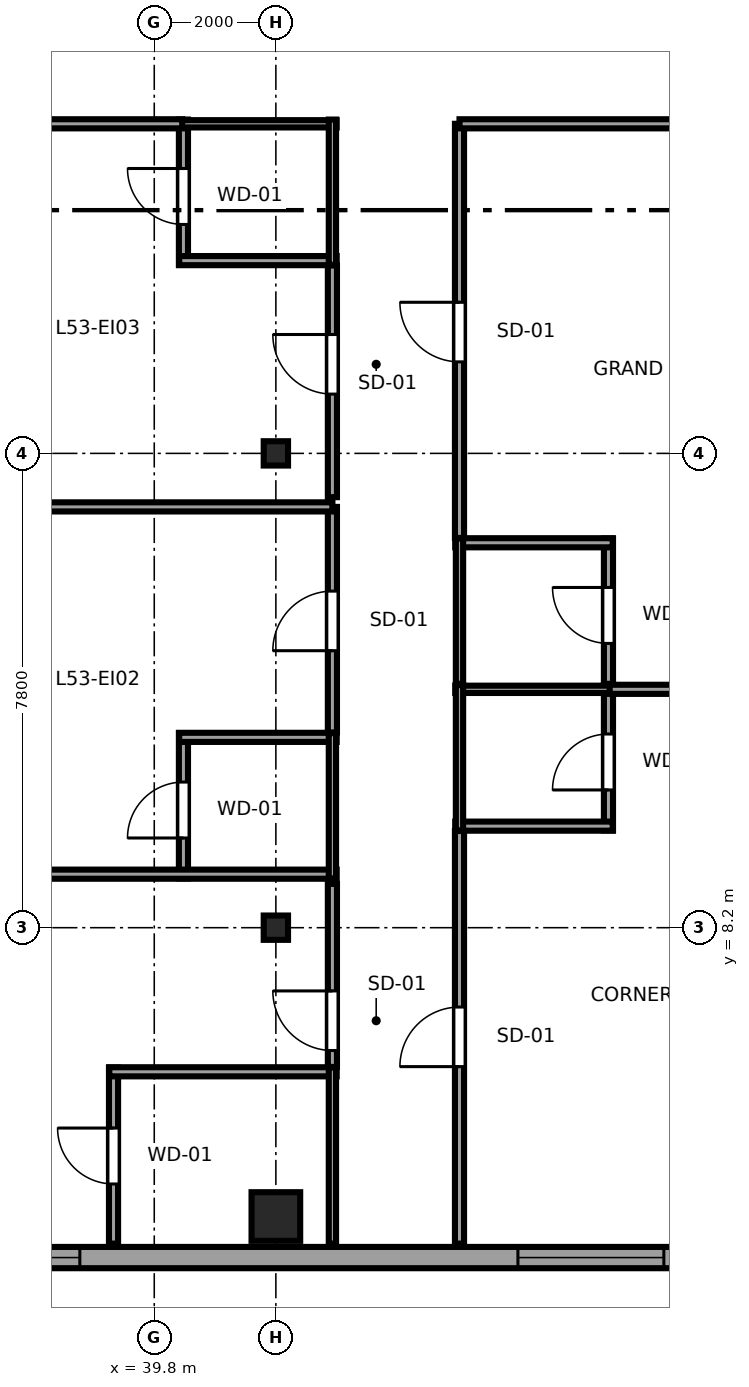
"""IFC4 building model, lengths in metres.
Left out: names, types, materials, properties, quantities, classifications, styles, units other than length and angle.
Written with IfcOpenShell. Run it as: python <this file> out.ifc"""

import sys

from ifc_helpers import new_model, si_unit, direction, frame, frame_2d, origin, origin_2d, place, context, subcontext, project, spatial, rectangle, i_section, extrude, source, transform, mapped, element, fill, save


model = new_model("IFC4")
c1 = context("Model", 3, precision=1e-05, world=origin(), true_north=direction((0.0, 1.0)))
c2 = subcontext(c1, "Body", "Model", "MODEL_VIEW")
j1 = project(units=[si_unit("LENGTHUNIT", "METRE"), si_unit("PLANEANGLEUNIT", "RADIAN")], contexts=[c1])
p1 = place(None, origin())
s1 = spatial("IfcSite", under=j1, at=p1, CompositionType="ELEMENT")
p2 = place(p1, origin())
s2 = spatial("IfcBuilding", under=s1, at=p2, CompositionType="ELEMENT")
p3 = place(p2, frame((0.0, 0.0, 201.75)))
s3 = spatial("IfcBuildingStorey", under=s2, at=p3, CompositionType="ELEMENT", Elevation=201.75)
m1 = source(origin(), c2, "Body", "SweptSolid", [
    extrude(rectangle(XDim=0.8, YDim=0.8, at=origin_2d()), origin(), (0.0, 0.0, 1.0), 3.55),
])
p4 = place(p3, frame((41.8, 3.45, 0.0), z_axis=(0.0, 0.0, 1.0), x_axis=(1.0, 0.0, 0.0)))
e1 = element("IfcColumn", 1, at=p4, inside=s3, PredefinedType="COLUMN", context=c2, shape_type="MappedRepresentation", body=[
    mapped(m1, transform((0.0, 0.0, 0.0), x_axis=(1.0, 0.0, 0.0), y_axis=(0.0, 1.0, 0.0), z_axis=(0.0, 0.0, 1.0), scale=1.0)),
])
m2 = source(origin(), c2, "Body", "SweptSolid", [
    extrude(i_section(OverallWidth=0.4, OverallDepth=0.4, WebThickness=0.02, FlangeThickness=0.035, at=origin_2d()), origin(), (0.0, 0.0, 1.0), 3.55),
])
for number, where, z_axis, x_axis in (
    (2, (41.8, 8.2, 0.0), (0.0, 0.0, 1.0), (1.0, 0.0, 0.0)),
    (3, (41.8, 16.0, 0.0), (0.0, 0.0, 1.0), (1.0, 0.0, 0.0)),
):
    element("IfcColumn", number, at=place(p3, frame(where, z_axis=z_axis, x_axis=x_axis)), inside=s3, PredefinedType="COLUMN", context=c2, shape_type="MappedRepresentation", body=[
        mapped(m2, transform((0.0, 0.0, 0.0), x_axis=(1.0, 0.0, 0.0), y_axis=(0.0, 1.0, 0.0), z_axis=(0.0, 0.0, 1.0), scale=1.0)),
    ])
p5 = place(p3, frame((34.375, 2.775, 0.0), z_axis=(0.0, 0.0, 1.0), x_axis=(1.0, 0.0, 0.0)))
e4 = element("IfcWall", 4, at=p5, inside=s3, PredefinedType="SOLIDWALL", context=c2, shape_type="SweptSolid", body=[
    extrude(rectangle(XDim=15.608, YDim=0.35, at=frame_2d((7.804, 0.0))), origin(), (0.0, 0.0, 1.0), 3.29),
])
p6 = place(p5, frame((1.801, 0.0, 0.68)))
e5 = element("IfcOpeningElement", 5, at=p6, cuts=e4, PredefinedType="OPENING", context=c2, shape_type="SweptSolid", body=[
    extrude(rectangle(XDim=2.4, YDim=1.9, at=frame_2d((1.2, 0.95))), frame((0.0, 0.185, 0.0), z_axis=(0.0, -1.0, 0.0), x_axis=(1.0, 0.0, 0.0)), (0.0, 0.0, 1.0), 0.37),
])
p7 = place(p5, frame((11.406, 0.0, 0.68)))
e6 = element("IfcOpeningElement", 6, at=p7, cuts=e4, PredefinedType="OPENING", context=c2, shape_type="SweptSolid", body=[
    extrude(rectangle(XDim=2.4, YDim=1.9, at=frame_2d((1.2, 0.95))), frame((0.0, 0.185, 0.0), z_axis=(0.0, -1.0, 0.0), x_axis=(1.0, 0.0, 0.0)), (0.0, 0.0, 1.0), 0.37),
])
p8 = place(p3, frame((39.13, 3.005, 0.0), z_axis=(0.0, 0.0, 1.0), x_axis=(0.0, 1.0, 0.0)))
e7 = element("IfcWall", 7, at=p8, inside=s3, PredefinedType="PARTITIONING", context=c2, shape_type="SweptSolid", body=[
    extrude(rectangle(XDim=2.895, YDim=0.15, at=frame_2d((1.448, 0.0))), origin(), (0.0, 0.0, 1.0), 3.29),
])
p9 = place(p8, frame((0.98, 0.0, 0.0)))
e8 = element("IfcOpeningElement", 8, at=p9, cuts=e7, PredefinedType="OPENING", context=c2, shape_type="SweptSolid", body=[
    extrude(rectangle(XDim=0.92, YDim=2.01, at=frame_2d((0.46, 1.005))), frame((0.0, 0.085, 0.0), z_axis=(0.0, -1.0, 0.0), x_axis=(1.0, 0.0, 0.0)), (0.0, 0.0, 1.0), 0.17),
])
p10 = place(p3, frame((39.06, 5.83, 0.0), z_axis=(0.0, 0.0, 1.0), x_axis=(1.0, 0.0, 0.0)))
e9 = element("IfcWall", 9, at=p10, inside=s3, PredefinedType="PARTITIONING", context=c2, shape_type="SweptSolid", body=[
    extrude(rectangle(XDim=3.74, YDim=0.15, at=frame_2d((1.87, 0.0))), origin(), (0.0, 0.0, 1.0), 3.29),
])
p11 = place(p3, frame((42.73, 3.005, 0.0), z_axis=(0.0, 0.0, 1.0), x_axis=(0.0, 1.0, 0.0)))
e10 = element("IfcWall", 10, at=p11, inside=s3, PredefinedType="PLUMBINGWALL", context=c2, shape_type="SweptSolid", body=[
    extrude(rectangle(XDim=2.895, YDim=0.12, at=frame_2d((1.448, 0.0))), origin(), (0.0, 0.0, 1.0), 3.29),
])
p12 = place(p3, frame((40.28, 9.01, 0.0), z_axis=(0.0, 0.0, 1.0), x_axis=(0.0, 1.0, 0.0)))
e11 = element("IfcWall", 11, at=p12, inside=s3, PredefinedType="PARTITIONING", context=c2, shape_type="SweptSolid", body=[
    extrude(rectangle(XDim=2.39, YDim=0.15, at=frame_2d((1.195, 0.0))), origin(), (0.0, 0.0, 1.0), 3.29),
])
p13 = place(p12, frame((0.665, 0.0, 0.0)))
e12 = element("IfcOpeningElement", 12, at=p13, cuts=e11, PredefinedType="OPENING", context=c2, shape_type="SweptSolid", body=[
    extrude(rectangle(XDim=0.92, YDim=2.01, at=frame_2d((0.46, 1.005))), frame((0.0, 0.085, 0.0), z_axis=(0.0, -1.0, 0.0), x_axis=(1.0, 0.0, 0.0)), (0.0, 0.0, 1.0), 0.17),
])
p14 = place(p3, frame((34.65, 9.08, 0.0), z_axis=(0.0, 0.0, 1.0), x_axis=(1.0, 0.0, 0.0)))
e13 = element("IfcWall", 13, at=p14, inside=s3, PredefinedType="PARTITIONING", context=c2, shape_type="SweptSolid", body=[
    extrude(rectangle(XDim=8.15, YDim=0.15, at=frame_2d((4.075, 0.0))), origin(), (0.0, 0.0, 1.0), 3.29),
])
p15 = place(p3, frame((40.21, 11.33, 0.0), z_axis=(0.0, 0.0, 1.0), x_axis=(1.0, 0.0, 0.0)))
e14 = element("IfcWall", 14, at=p15, inside=s3, PredefinedType="PARTITIONING", context=c2, shape_type="SweptSolid", body=[
    extrude(rectangle(XDim=2.59, YDim=0.15, at=frame_2d((1.295, 0.0))), origin(), (0.0, 0.0, 1.0), 3.29),
])
p16 = place(p3, frame((42.73, 9.01, 0.0), z_axis=(0.0, 0.0, 1.0), x_axis=(0.0, 1.0, 0.0)))
e15 = element("IfcWall", 15, at=p16, inside=s3, PredefinedType="PLUMBINGWALL", context=c2, shape_type="SweptSolid", body=[
    extrude(rectangle(XDim=2.39, YDim=0.12, at=frame_2d((1.195, 0.0))), origin(), (0.0, 0.0, 1.0), 3.29),
])
p17 = place(p3, frame((40.28, 19.1, 0.0), z_axis=(0.0, 0.0, 1.0), x_axis=(0.0, 1.0, 0.0)))
e16 = element("IfcWall", 16, at=p17, inside=s3, PredefinedType="PARTITIONING", context=c2, shape_type="SweptSolid", body=[
    extrude(rectangle(XDim=2.39, YDim=0.15, at=frame_2d((1.195, 0.0))), origin(), (0.0, 0.0, 1.0), 3.29),
])
p18 = place(p17, frame((0.665, 0.0, 0.0)))
e17 = element("IfcOpeningElement", 17, at=p18, cuts=e16, PredefinedType="OPENING", context=c2, shape_type="SweptSolid", body=[
    extrude(rectangle(XDim=0.92, YDim=2.01, at=frame_2d((0.46, 1.005))), frame((0.0, 0.085, 0.0), z_axis=(0.0, -1.0, 0.0), x_axis=(1.0, 0.0, 0.0)), (0.0, 0.0, 1.0), 0.17),
])
p19 = place(p3, frame((40.21, 19.17, 0.0), z_axis=(0.0, 0.0, 1.0), x_axis=(1.0, 0.0, 0.0)))
e18 = element("IfcWall", 18, at=p19, inside=s3, PredefinedType="PARTITIONING", context=c2, shape_type="SweptSolid", body=[
    extrude(rectangle(XDim=2.59, YDim=0.15, at=frame_2d((1.295, 0.0))), origin(), (0.0, 0.0, 1.0), 3.29),
])
p20 = place(p3, frame((40.21, 21.42, 0.0), z_axis=(0.0, 0.0, 1.0), x_axis=(1.0, 0.0, 0.0)))
e19 = element("IfcWall", 19, at=p20, inside=s3, PredefinedType="PLUMBINGWALL", context=c2, shape_type="SweptSolid", body=[
    extrude(rectangle(XDim=2.59, YDim=0.12, at=frame_2d((1.295, 0.0))), origin(), (0.0, 0.0, 1.0), 3.29),
])
p21 = place(p3, frame((42.73, 19.1, 0.0), z_axis=(0.0, 0.0, 1.0), x_axis=(0.0, 1.0, 0.0)))
e20 = element("IfcWall", 20, at=p21, inside=s3, PredefinedType="PLUMBINGWALL", context=c2, shape_type="SweptSolid", body=[
    extrude(rectangle(XDim=2.39, YDim=0.12, at=frame_2d((1.195, 0.0))), origin(), (0.0, 0.0, 1.0), 3.29),
])
p22 = place(p3, frame((47.27, 9.8, 0.0), z_axis=(0.0, 0.0, 1.0), x_axis=(0.0, 1.0, 0.0)))
e21 = element("IfcWall", 21, at=p22, inside=s3, PredefinedType="PARTITIONING", context=c2, shape_type="SweptSolid", body=[
    extrude(rectangle(XDim=2.39, YDim=0.15, at=frame_2d((1.195, 0.0))), origin(), (0.0, 0.0, 1.0), 3.29),
])
p23 = place(p22, frame((0.665, 0.0, 0.0)))
e22 = element("IfcOpeningElement", 22, at=p23, cuts=e21, PredefinedType="OPENING", context=c2, shape_type="SweptSolid", body=[
    extrude(rectangle(XDim=0.92, YDim=2.01, at=frame_2d((0.46, 1.005))), frame((0.0, 0.085, 0.0), z_axis=(0.0, -1.0, 0.0), x_axis=(1.0, 0.0, 0.0)), (0.0, 0.0, 1.0), 0.17),
])
p24 = place(p3, frame((44.75, 9.87, 0.0), z_axis=(0.0, 0.0, 1.0), x_axis=(1.0, 0.0, 0.0)))
e23 = element("IfcWall", 23, at=p24, inside=s3, PredefinedType="PARTITIONING", context=c2, shape_type="SweptSolid", body=[
    extrude(rectangle(XDim=2.59, YDim=0.15, at=frame_2d((1.295, 0.0))), origin(), (0.0, 0.0, 1.0), 3.29),
])
p25 = place(p3, frame((44.75, 12.12, 0.0), z_axis=(0.0, 0.0, 1.0), x_axis=(1.0, 0.0, 0.0)))
e24 = element("IfcWall", 24, at=p25, inside=s3, PredefinedType="PLUMBINGWALL", context=c2, shape_type="SweptSolid", body=[
    extrude(rectangle(XDim=2.59, YDim=0.12, at=frame_2d((1.295, 0.0))), origin(), (0.0, 0.0, 1.0), 3.29),
])
p26 = place(p3, frame((44.82, 9.8, 0.0), z_axis=(0.0, 0.0, 1.0), x_axis=(0.0, 1.0, 0.0)))
e25 = element("IfcWall", 25, at=p26, inside=s3, PredefinedType="PLUMBINGWALL", context=c2, shape_type="SweptSolid", body=[
    extrude(rectangle(XDim=2.39, YDim=0.12, at=frame_2d((1.195, 0.0))), origin(), (0.0, 0.0, 1.0), 3.29),
])
p27 = place(p3, frame((47.27, 12.21, 0.0), z_axis=(0.0, 0.0, 1.0), x_axis=(0.0, 1.0, 0.0)))
e26 = element("IfcWall", 26, at=p27, inside=s3, PredefinedType="PARTITIONING", context=c2, shape_type="SweptSolid", body=[
    extrude(rectangle(XDim=2.39, YDim=0.15, at=frame_2d((1.195, 0.0))), origin(), (0.0, 0.0, 1.0), 3.29),
])
p28 = place(p27, frame((0.665, 0.0, 0.0)))
e27 = element("IfcOpeningElement", 27, at=p28, cuts=e26, PredefinedType="OPENING", context=c2, shape_type="SweptSolid", body=[
    extrude(rectangle(XDim=0.92, YDim=2.01, at=frame_2d((0.46, 1.005))), frame((0.0, 0.085, 0.0), z_axis=(0.0, -1.0, 0.0), x_axis=(1.0, 0.0, 0.0)), (0.0, 0.0, 1.0), 0.17),
])
p29 = place(p3, frame((44.75, 14.53, 0.0), z_axis=(0.0, 0.0, 1.0), x_axis=(1.0, 0.0, 0.0)))
e28 = element("IfcWall", 28, at=p29, inside=s3, PredefinedType="PARTITIONING", context=c2, shape_type="SweptSolid", body=[
    extrude(rectangle(XDim=2.59, YDim=0.15, at=frame_2d((1.295, 0.0))), origin(), (0.0, 0.0, 1.0), 3.29),
])
p30 = place(p3, frame((44.82, 12.21, 0.0), z_axis=(0.0, 0.0, 1.0), x_axis=(0.0, 1.0, 0.0)))
e29 = element("IfcWall", 29, at=p30, inside=s3, PredefinedType="PLUMBINGWALL", context=c2, shape_type="SweptSolid", body=[
    extrude(rectangle(XDim=2.39, YDim=0.12, at=frame_2d((1.195, 0.0))), origin(), (0.0, 0.0, 1.0), 3.29),
])
p31 = place(p3, frame((42.73, 5.91, 0.0), z_axis=(0.0, 0.0, 1.0), x_axis=(0.0, 1.0, 0.0)))
e30 = element("IfcWall", 30, at=p31, inside=s3, PredefinedType="PARTITIONING", context=c2, shape_type="SweptSolid", body=[
    extrude(rectangle(XDim=3.01, YDim=0.15, at=frame_2d((1.505, 0.0))), origin(), (0.0, 0.0, 1.0), 3.29),
])
p32 = place(p31, frame((0.27, 0.0, 0.0)))
e31 = element("IfcOpeningElement", 31, at=p32, cuts=e30, PredefinedType="OPENING", context=c2, shape_type="SweptSolid", body=[
    extrude(rectangle(XDim=0.98, YDim=2.12, at=frame_2d((0.49, 1.06))), frame((0.0, 0.085, 0.0), z_axis=(0.0, -1.0, 0.0), x_axis=(1.0, 0.0, 0.0)), (0.0, 0.0, 1.0), 0.17),
])
p33 = place(p3, frame((42.73, 11.41, 0.0), z_axis=(0.0, 0.0, 1.0), x_axis=(0.0, 1.0, 0.0)))
e32 = element("IfcWall", 32, at=p33, inside=s3, PredefinedType="PARTITIONING", context=c2, shape_type="SweptSolid", body=[
    extrude(rectangle(XDim=3.71, YDim=0.15, at=frame_2d((1.855, 0.0))), origin(), (0.0, 0.0, 1.0), 3.29),
])
p34 = place(p33, frame((1.345, 0.0, 0.0)))
e33 = element("IfcOpeningElement", 33, at=p34, cuts=e32, PredefinedType="OPENING", context=c2, shape_type="SweptSolid", body=[
    extrude(rectangle(XDim=0.98, YDim=2.12, at=frame_2d((0.49, 1.06))), frame((0.0, 0.085, 0.0), z_axis=(0.0, -1.0, 0.0), x_axis=(1.0, 0.0, 0.0)), (0.0, 0.0, 1.0), 0.17),
])
p35 = place(p3, frame((34.65, 15.12, 0.0), z_axis=(0.0, 0.0, 1.0), x_axis=(1.0, 0.0, 0.0)))
e34 = element("IfcWall", 34, at=p35, inside=s3, PredefinedType="PARTITIONING", context=c2, shape_type="SweptSolid", body=[
    extrude(rectangle(XDim=8.08, YDim=0.15, at=frame_2d((4.04, 0.0))), origin(), (0.0, 0.0, 1.0), 3.29),
])
p36 = place(p3, frame((42.73, 15.28, 0.0), z_axis=(0.0, 0.0, 1.0), x_axis=(0.0, 1.0, 0.0)))
e35 = element("IfcWall", 35, at=p36, inside=s3, PredefinedType="PARTITIONING", context=c2, shape_type="SweptSolid", body=[
    extrude(rectangle(XDim=3.81, YDim=0.15, at=frame_2d((1.905, 0.0))), origin(), (0.0, 0.0, 1.0), 3.29),
])
p37 = place(p36, frame((1.695, 0.0, 0.0)))
e36 = element("IfcOpeningElement", 36, at=p37, cuts=e35, PredefinedType="OPENING", context=c2, shape_type="SweptSolid", body=[
    extrude(rectangle(XDim=0.98, YDim=2.12, at=frame_2d((0.49, 1.06))), frame((0.0, 0.085, 0.0), z_axis=(0.0, -1.0, 0.0), x_axis=(1.0, 0.0, 0.0)), (0.0, 0.0, 1.0), 0.17),
])
p38 = place(p3, frame((34.65, 21.42, 0.0), z_axis=(0.0, 0.0, 1.0), x_axis=(1.0, 0.0, 0.0)))
e37 = element("IfcWall", 37, at=p38, inside=s3, PredefinedType="PARTITIONING", context=c2, shape_type="SweptSolid", body=[
    extrude(rectangle(XDim=5.61, YDim=0.15, at=frame_2d((2.805, 0.0))), origin(), (0.0, 0.0, 1.0), 3.29),
])
p39 = place(p3, frame((44.82, 3.005, 0.0), z_axis=(0.0, 0.0, 1.0), x_axis=(0.0, 1.0, 0.0)))
e38 = element("IfcWall", 38, at=p39, inside=s3, PredefinedType="PARTITIONING", context=c2, shape_type="SweptSolid", body=[
    extrude(rectangle(XDim=6.785, YDim=0.15, at=frame_2d((3.393, 0.0))), origin(), (0.0, 0.0, 1.0), 3.29),
])
p40 = place(p39, frame((2.91, 0.0, 0.0)))
e39 = element("IfcOpeningElement", 39, at=p40, cuts=e38, PredefinedType="OPENING", context=c2, shape_type="SweptSolid", body=[
    extrude(rectangle(XDim=0.98, YDim=2.12, at=frame_2d((0.49, 1.06))), frame((0.0, 0.085, 0.0), z_axis=(0.0, -1.0, 0.0), x_axis=(1.0, 0.0, 0.0)), (0.0, 0.0, 1.0), 0.17),
])
p41 = place(p3, frame((47.29, 12.12, 0.0), z_axis=(0.0, 0.0, 1.0), x_axis=(1.0, 0.0, 0.0)))
e40 = element("IfcWall", 40, at=p41, inside=s3, PredefinedType="PARTITIONING", context=c2, shape_type="SweptSolid", body=[
    extrude(rectangle(XDim=6.705, YDim=0.15, at=frame_2d((3.353, 0.0))), origin(), (0.0, 0.0, 1.0), 3.29),
])
p42 = place(p3, frame((44.82, 14.61, 0.0), z_axis=(0.0, 0.0, 1.0), x_axis=(0.0, 1.0, 0.0)))
e41 = element("IfcWall", 41, at=p42, inside=s3, PredefinedType="PARTITIONING", context=c2, shape_type="SweptSolid", body=[
    extrude(rectangle(XDim=6.81, YDim=0.15, at=frame_2d((3.405, 0.0))), origin(), (0.0, 0.0, 1.0), 3.29),
])
p43 = place(p42, frame((2.895, 0.0, 0.0)))
e42 = element("IfcOpeningElement", 42, at=p43, cuts=e41, PredefinedType="OPENING", context=c2, shape_type="SweptSolid", body=[
    extrude(rectangle(XDim=0.98, YDim=2.12, at=frame_2d((0.49, 1.06))), frame((0.0, 0.085, 0.0), z_axis=(0.0, -1.0, 0.0), x_axis=(1.0, 0.0, 0.0)), (0.0, 0.0, 1.0), 0.17),
])
p44 = place(p3, frame((44.82, 21.42, 0.0), z_axis=(0.0, 0.0, 1.0), x_axis=(1.0, 0.0, 0.0)))
e43 = element("IfcWall", 43, at=p44, inside=s3, PredefinedType="PARTITIONING", context=c2, shape_type="SweptSolid", body=[
    extrude(rectangle(XDim=9.175, YDim=0.15, at=frame_2d((4.587, 0.0))), origin(), (0.0, 0.0, 1.0), 3.29),
])
m3 = source(origin(), c2, "Body", "SweptSolid", [
    extrude(rectangle(XDim=2.4, YDim=1.9, at=frame_2d((1.2, 0.95))), frame((0.0, 0.09, 0.0), z_axis=(0.0, -1.0, 0.0), x_axis=(1.0, 0.0, 0.0)), (0.0, 0.0, 1.0), 0.06),
])
p45 = place(p6, origin())
e44 = element("IfcWindow", 44, at=p45, inside=s3, PartitioningType="TRIPLE_PANEL_HORIZONTAL", PredefinedType="WINDOW", context=c2, shape_type="MappedRepresentation", body=[
    mapped(m3, transform((0.0, 0.0, 0.0), x_axis=(1.0, 0.0, 0.0), y_axis=(0.0, 1.0, 0.0), z_axis=(0.0, 0.0, 1.0), scale=1.0)),
])
fill(e5, e44)
p46 = place(p7, origin())
e45 = element("IfcWindow", 45, at=p46, inside=s3, PartitioningType="TRIPLE_PANEL_HORIZONTAL", PredefinedType="WINDOW", context=c2, shape_type="MappedRepresentation", body=[
    mapped(m3, transform((0.0, 0.0, 0.0), x_axis=(1.0, 0.0, 0.0), y_axis=(0.0, 1.0, 0.0), z_axis=(0.0, 0.0, 1.0), scale=1.0)),
])
fill(e6, e45)
m4 = source(origin(), c2, "Body", "SweptSolid", [
    extrude(rectangle(XDim=0.92, YDim=2.01, at=frame_2d((0.46, 1.005))), frame((0.0, 0.025, 0.0), z_axis=(0.0, -1.0, 0.0), x_axis=(1.0, 0.0, 0.0)), (0.0, 0.0, 1.0), 0.05),
])
p47 = place(p9, origin())
e46 = element("IfcDoor", 46, at=p47, inside=s3, OperationType="SINGLE_SWING_RIGHT", PredefinedType="DOOR", context=c2, shape_type="MappedRepresentation", body=[
    mapped(m4, transform((0.0, 0.0, 0.0), x_axis=(1.0, 0.0, 0.0), y_axis=(0.0, 1.0, 0.0), z_axis=(0.0, 0.0, 1.0), scale=1.0)),
])
fill(e8, e46)
p48 = place(p13, origin())
e47 = element("IfcDoor", 47, at=p48, inside=s3, OperationType="SINGLE_SWING_LEFT", PredefinedType="DOOR", context=c2, shape_type="MappedRepresentation", body=[
    mapped(m4, transform((0.0, 0.0, 0.0), x_axis=(1.0, 0.0, 0.0), y_axis=(0.0, 1.0, 0.0), z_axis=(0.0, 0.0, 1.0), scale=1.0)),
])
fill(e12, e47)
p49 = place(p18, origin())
e48 = element("IfcDoor", 48, at=p49, inside=s3, OperationType="SINGLE_SWING_RIGHT", PredefinedType="DOOR", context=c2, shape_type="MappedRepresentation", body=[
    mapped(m4, transform((0.0, 0.0, 0.0), x_axis=(1.0, 0.0, 0.0), y_axis=(0.0, 1.0, 0.0), z_axis=(0.0, 0.0, 1.0), scale=1.0)),
])
fill(e17, e48)
p50 = place(p23, origin())
e49 = element("IfcDoor", 49, at=p50, inside=s3, OperationType="SINGLE_SWING_LEFT", PredefinedType="DOOR", context=c2, shape_type="MappedRepresentation", body=[
    mapped(m4, transform((0.0, 0.0, 0.0), x_axis=(1.0, 0.0, 0.0), y_axis=(0.0, 1.0, 0.0), z_axis=(0.0, 0.0, 1.0), scale=1.0)),
])
fill(e22, e49)
p51 = place(p28, origin())
e50 = element("IfcDoor", 50, at=p51, inside=s3, OperationType="SINGLE_SWING_RIGHT", PredefinedType="DOOR", context=c2, shape_type="MappedRepresentation", body=[
    mapped(m4, transform((0.0, 0.0, 0.0), x_axis=(1.0, 0.0, 0.0), y_axis=(0.0, 1.0, 0.0), z_axis=(0.0, 0.0, 1.0), scale=1.0)),
])
fill(e27, e50)
m5 = source(origin(), c2, "Body", "SweptSolid", [
    extrude(rectangle(XDim=0.98, YDim=2.12, at=frame_2d((0.49, 1.06))), frame((0.0, 0.025, 0.0), z_axis=(0.0, -1.0, 0.0), x_axis=(1.0, 0.0, 0.0)), (0.0, 0.0, 1.0), 0.05),
])
p52 = place(p32, origin())
e51 = element("IfcDoor", 51, at=p52, inside=s3, OperationType="SINGLE_SWING_RIGHT", PredefinedType="DOOR", context=c2, shape_type="MappedRepresentation", body=[
    mapped(m5, transform((0.0, 0.0, 0.0), x_axis=(1.0, 0.0, 0.0), y_axis=(0.0, 1.0, 0.0), z_axis=(0.0, 0.0, 1.0), scale=1.0)),
])
fill(e31, e51)
p53 = place(p34, origin())
e52 = element("IfcDoor", 52, at=p53, inside=s3, OperationType="SINGLE_SWING_LEFT", PredefinedType="DOOR", context=c2, shape_type="MappedRepresentation", body=[
    mapped(m5, transform((0.0, 0.0, 0.0), x_axis=(1.0, 0.0, 0.0), y_axis=(0.0, 1.0, 0.0), z_axis=(0.0, 0.0, 1.0), scale=1.0)),
])
fill(e33, e52)
p54 = place(p37, origin())
e53 = element("IfcDoor", 53, at=p54, inside=s3, OperationType="SINGLE_SWING_RIGHT", PredefinedType="DOOR", context=c2, shape_type="MappedRepresentation", body=[
    mapped(m5, transform((0.0, 0.0, 0.0), x_axis=(1.0, 0.0, 0.0), y_axis=(0.0, 1.0, 0.0), z_axis=(0.0, 0.0, 1.0), scale=1.0)),
])
fill(e36, e53)
p55 = place(p40, origin())
e54 = element("IfcDoor", 54, at=p55, inside=s3, OperationType="SINGLE_SWING_LEFT", PredefinedType="DOOR", context=c2, shape_type="MappedRepresentation", body=[
    mapped(m5, transform((0.0, 0.0, 0.0), x_axis=(1.0, 0.0, 0.0), y_axis=(0.0, 1.0, 0.0), z_axis=(0.0, 0.0, 1.0), scale=1.0)),
])
fill(e39, e54)
p56 = place(p43, origin())
e55 = element("IfcDoor", 55, at=p56, inside=s3, OperationType="SINGLE_SWING_RIGHT", PredefinedType="DOOR", context=c2, shape_type="MappedRepresentation", body=[
    mapped(m5, transform((0.0, 0.0, 0.0), x_axis=(1.0, 0.0, 0.0), y_axis=(0.0, 1.0, 0.0), z_axis=(0.0, 0.0, 1.0), scale=1.0)),
])
fill(e42, e55)
save(model, sys.argv[1])
